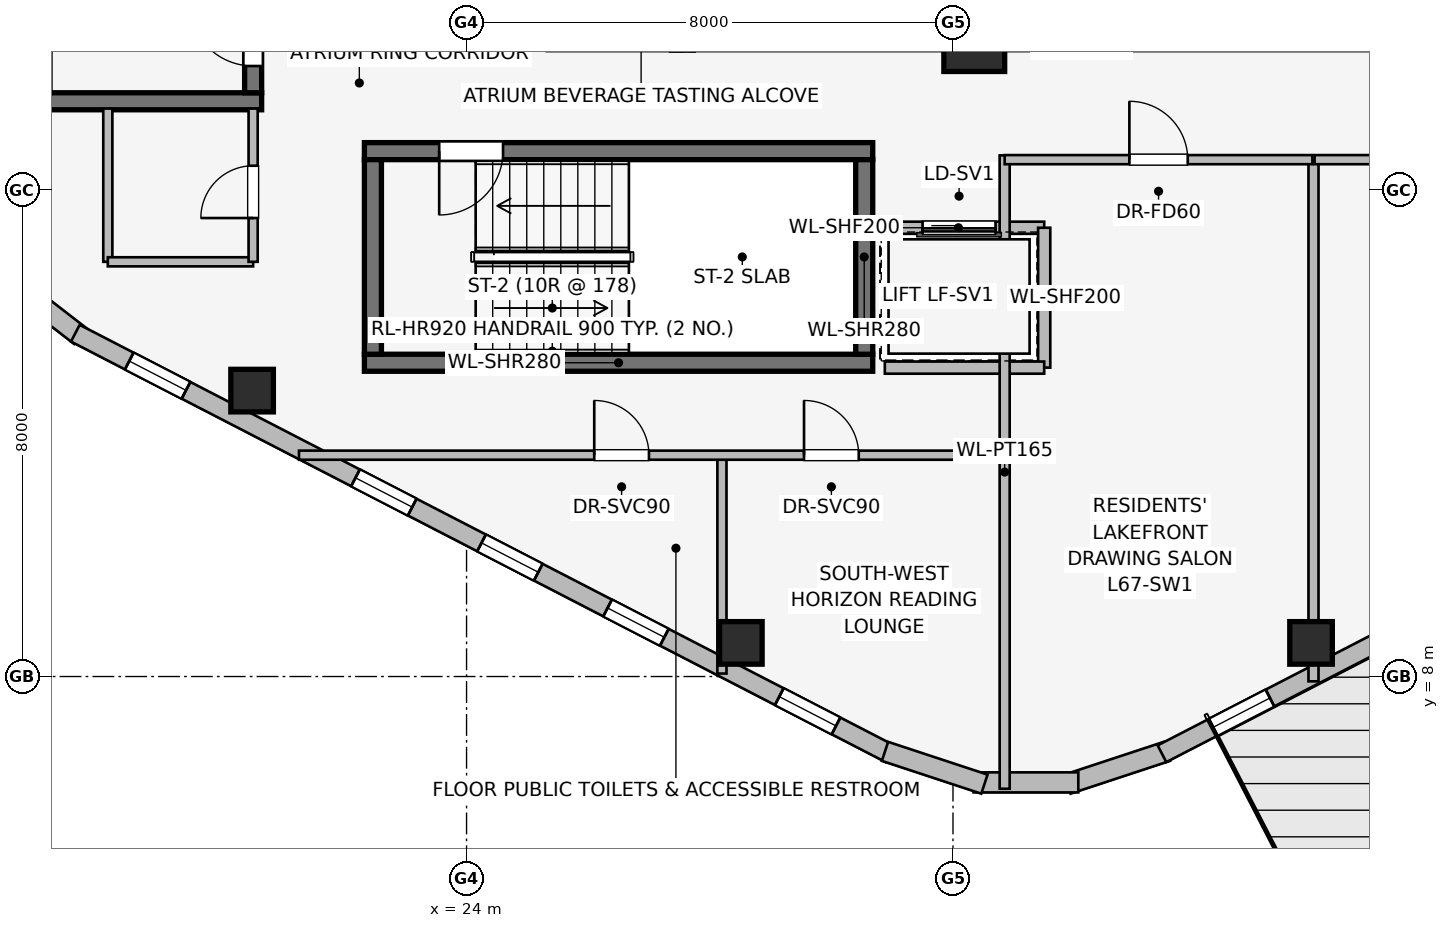
"""IFC4 building model, lengths in metres.
Left out: names, types, materials, properties, quantities, classifications, styles, units other than length and angle.
Written with IfcOpenShell. Run it as: python <this file> out.ifc"""

import sys

from ifc_helpers import new_model, si_unit, direction, frame, frame_2d, origin, origin_2d, place, context, subcontext, project, spatial, rectangle, extrude, element, fill, save


model = new_model("IFC4")
c1 = context("Model", 3, precision=1e-05, world=origin(), true_north=direction((0.0, 1.0)))
c2 = subcontext(c1, "Body", "Model", "MODEL_VIEW")
j1 = project(units=[si_unit("LENGTHUNIT", "METRE"), si_unit("PLANEANGLEUNIT", "RADIAN")], contexts=[c1])
p1 = place(None, origin())
s1 = spatial("IfcSite", under=j1, at=p1, CompositionType="ELEMENT")
p2 = place(p1, origin())
s2 = spatial("IfcBuilding", under=s1, at=p2, CompositionType="ELEMENT")
p3 = place(p2, frame((0.0, 0.0, 245.45)))
s3 = spatial("IfcBuildingStorey", under=s2, at=p3, CompositionType="ELEMENT", Elevation=245.45)
p4 = place(p3, frame((16.87, 17.46, 0.0), z_axis=(0.0, 0.0, 1.0), x_axis=(1.0, 0.0, 0.0)))
e1 = element("IfcWall", 1, at=p4, inside=s3, PredefinedType="SHEAR", context=c2, shape_type="SweptSolid", body=[
    extrude(rectangle(XDim=3.76, YDim=0.28, at=frame_2d((1.88, 0.0))), origin(), (0.0, 0.0, 1.0), 3.55),
])
p5 = place(p3, frame((20.49, 17.6, 0.0), z_axis=(0.0, 0.0, 1.0), x_axis=(0.0, 1.0, 0.0)))
e2 = element("IfcWall", 2, at=p5, inside=s3, PredefinedType="SHEAR", context=c2, shape_type="SweptSolid", body=[
    extrude(rectangle(XDim=7.8, YDim=0.28, at=frame_2d((3.9, 0.0))), origin(), (0.0, 0.0, 1.0), 3.55),
])
p6 = place(p5, frame((0.44, 0.0, 0.0)))
e3 = element("IfcOpeningElement", 3, at=p6, cuts=e2, PredefinedType="OPENING", context=c2, shape_type="SweptSolid", body=[
    extrude(rectangle(XDim=1.05, YDim=2.0, at=frame_2d((0.525, 1.0))), frame((0.0, 0.15, 0.0), z_axis=(0.0, -1.0, 0.0), x_axis=(1.0, 0.0, 0.0)), (0.0, 0.0, 1.0), 0.3),
])
p7 = place(p3, frame((22.32, 13.16, 0.0), z_axis=(0.0, 0.0, 1.0), x_axis=(1.0, 0.0, 0.0)))
e4 = element("IfcWall", 4, at=p7, inside=s3, PredefinedType="SHEAR", context=c2, shape_type="SweptSolid", body=[
    extrude(rectangle(XDim=8.36, YDim=0.28, at=frame_2d((4.18, 0.0))), origin(), (0.0, 0.0, 1.0), 3.55),
])
p8 = place(p3, frame((30.68, 16.64, 0.0), z_axis=(0.0, 0.0, 1.0), x_axis=(-1.0, 0.0, 0.0)))
e5 = element("IfcWall", 5, at=p8, inside=s3, PredefinedType="SHEAR", context=c2, shape_type="SweptSolid", body=[
    extrude(rectangle(XDim=8.36, YDim=0.28, at=frame_2d((4.18, 0.0))), origin(), (0.0, 0.0, 1.0), 3.55),
])
p9 = place(p8, frame((6.08, 0.0, 0.0)))
e6 = element("IfcOpeningElement", 6, at=p9, cuts=e5, PredefinedType="OPENING", context=c2, shape_type="SweptSolid", body=[
    extrude(rectangle(XDim=1.05, YDim=2.0, at=frame_2d((0.525, 1.0))), frame((0.0, 0.15, 0.0), z_axis=(0.0, -1.0, 0.0), x_axis=(1.0, 0.0, 0.0)), (0.0, 0.0, 1.0), 0.3),
])
for number, where, z_axis, x_axis in (
    (7, (22.46, 16.5, 0.0), (0.0, 0.0, 1.0), (0.0, -1.0, 0.0)),
    (8, (30.54, 13.3, 0.0), (0.0, 0.0, 1.0), (0.0, 1.0, 0.0)),
):
    element("IfcWall", number, at=place(p3, frame(where, z_axis=z_axis, x_axis=x_axis)), inside=s3, PredefinedType="SHEAR", context=c2, shape_type="SweptSolid", body=[
        extrude(rectangle(XDim=3.2, YDim=0.28, at=frame_2d((1.6, 0.0))), origin(), (0.0, 0.0, 1.0), 3.55),
    ])
p10 = place(p3, frame((32.35, 18.45, 0.0), z_axis=(0.0, 0.0, 1.0), x_axis=(1.0, 0.0, 0.0)))
e9 = element("IfcColumn", 9, at=p10, inside=s3, PredefinedType="COLUMN", context=c2, shape_type="SweptSolid", body=[
    extrude(rectangle(XDim=1.0, YDim=1.0, at=origin_2d()), origin(), (0.0, 0.0, 1.0), 3.55),
])
for number, where, z_axis, x_axis in (
    (10, (20.473, 12.702, 0.0), (0.0, 0.0, 1.0), (1.0, 0.0, 0.0)),
    (11, (28.511, 8.553, 0.0), (0.0, 0.0, 1.0), (1.0, 0.0, 0.0)),
    (12, (37.889, 8.553, 0.0), (0.0, 0.0, 1.0), (1.0, 0.0, 0.0)),
):
    element("IfcColumn", number, at=place(p3, frame(where, z_axis=z_axis, x_axis=x_axis)), inside=s3, PredefinedType="COLUMN", context=c2, shape_type="SweptSolid", body=[
        extrude(rectangle(XDim=0.7, YDim=0.7, at=origin_2d()), origin(), (0.0, 0.0, 1.0), 3.55),
    ])
p11 = place(p3, frame((17.647, 13.599, 0.0), z_axis=(0.0, 0.0, 1.0), x_axis=(-0.790691856293, 0.61221433207, 0.0)))
e13 = element("IfcWall", 13, at=p11, inside=s3, PredefinedType="STANDARD", context=c2, shape_type="SweptSolid", body=[
    extrude(rectangle(XDim=1.676, YDim=0.33, at=frame_2d((0.838, 0.0))), origin(), (0.0, 0.0, 1.0), 3.29),
])
p12 = place(p3, frame((30.963, 6.73, 0.0), z_axis=(0.0, 0.0, 1.0), x_axis=(-0.888581481622, 0.458718814218, 0.0)))
e14 = element("IfcWall", 14, at=p12, inside=s3, PredefinedType="STANDARD", context=c2, shape_type="SweptSolid", body=[
    extrude(rectangle(XDim=15.077, YDim=0.31, at=frame_2d((7.539, 0.0))), origin(), (0.0, 0.0, 1.0), 3.29),
])
p13 = place(p12, frame((0.998, 0.0, 0.75)))
e15 = element("IfcOpeningElement", 15, at=p13, cuts=e14, PredefinedType="OPENING", context=c2, shape_type="SweptSolid", body=[
    extrude(rectangle(XDim=1.05, YDim=1.4, at=frame_2d((0.525, 0.7))), frame((0.0, 0.165, 0.0), z_axis=(0.0, -1.0, 0.0), x_axis=(1.0, 0.0, 0.0)), (0.0, 0.0, 1.0), 0.33),
])
p14 = place(p12, frame((4.176, 0.0, 0.75)))
e16 = element("IfcOpeningElement", 16, at=p14, cuts=e14, PredefinedType="OPENING", context=c2, shape_type="SweptSolid", body=[
    extrude(rectangle(XDim=1.05, YDim=1.4, at=frame_2d((0.525, 0.7))), frame((0.0, 0.165, 0.0), z_axis=(0.0, -1.0, 0.0), x_axis=(1.0, 0.0, 0.0)), (0.0, 0.0, 1.0), 0.33),
])
p15 = place(p12, frame((6.509, 0.0, 0.75)))
e17 = element("IfcOpeningElement", 17, at=p15, cuts=e14, PredefinedType="OPENING", context=c2, shape_type="SweptSolid", body=[
    extrude(rectangle(XDim=1.05, YDim=1.4, at=frame_2d((0.525, 0.7))), frame((0.0, 0.165, 0.0), z_axis=(0.0, -1.0, 0.0), x_axis=(1.0, 0.0, 0.0)), (0.0, 0.0, 1.0), 0.33),
])
p16 = place(p12, frame((8.842, 0.0, 0.75)))
e18 = element("IfcOpeningElement", 18, at=p16, cuts=e14, PredefinedType="OPENING", context=c2, shape_type="SweptSolid", body=[
    extrude(rectangle(XDim=1.05, YDim=1.4, at=frame_2d((0.525, 0.7))), frame((0.0, 0.165, 0.0), z_axis=(0.0, -1.0, 0.0), x_axis=(1.0, 0.0, 0.0)), (0.0, 0.0, 1.0), 0.33),
])
p17 = place(p12, frame((13.029, 0.0, 0.75)))
e19 = element("IfcOpeningElement", 19, at=p17, cuts=e14, PredefinedType="OPENING", context=c2, shape_type="SweptSolid", body=[
    extrude(rectangle(XDim=1.05, YDim=1.4, at=frame_2d((0.525, 0.7))), frame((0.0, 0.165, 0.0), z_axis=(0.0, -1.0, 0.0), x_axis=(1.0, 0.0, 0.0)), (0.0, 0.0, 1.0), 0.33),
])
p18 = place(p3, frame((35.518, 6.769, 0.0), z_axis=(0.0, 0.0, 1.0), x_axis=(-0.949713440491, -0.313120393699, 0.0)))
e20 = element("IfcWall", 20, at=p18, inside=s3, PredefinedType="STANDARD", context=c2, shape_type="SweptSolid", body=[
    extrude(rectangle(XDim=1.722, YDim=0.33, at=frame_2d((0.861, 0.0))), origin(), (0.0, 0.0, 1.0), 3.29),
])
p19 = place(p3, frame((34.061, 6.259, 0.0), z_axis=(0.0, 0.0, 1.0), x_axis=(-1.0, 0.0, 0.0)))
e21 = element("IfcWall", 21, at=p19, inside=s3, PredefinedType="STANDARD", context=c2, shape_type="SweptSolid", body=[
    extrude(rectangle(XDim=1.722, YDim=0.33, at=frame_2d((0.861, 0.0))), origin(), (0.0, 0.0, 1.0), 3.29),
])
p20 = place(p3, frame((32.517, 6.23, 0.0), z_axis=(0.0, 0.0, 1.0), x_axis=(-0.949713440491, 0.313120393699, 0.0)))
e22 = element("IfcWall", 22, at=p20, inside=s3, PredefinedType="STANDARD", context=c2, shape_type="SweptSolid", body=[
    extrude(rectangle(XDim=1.722, YDim=0.33, at=frame_2d((0.861, 0.0))), origin(), (0.0, 0.0, 1.0), 3.29),
])
p21 = place(p3, frame((48.834, 13.646, 0.0), z_axis=(0.0, 0.0, 1.0), x_axis=(-0.888581481622, -0.458718814218, 0.0)))
e23 = element("IfcWall", 23, at=p21, inside=s3, PredefinedType="STANDARD", context=c2, shape_type="SweptSolid", body=[
    extrude(rectangle(XDim=15.077, YDim=0.31, at=frame_2d((7.539, 0.0))), origin(), (0.0, 0.0, 1.0), 3.29),
])
p22 = place(p21, frame((8.563, 0.0, 0.0)))
e24 = element("IfcOpeningElement", 24, at=p22, cuts=e23, PredefinedType="OPENING", context=c2, shape_type="SweptSolid", body=[
    extrude(rectangle(XDim=1.65, YDim=2.25, at=frame_2d((0.825, 1.125))), frame((0.0, 0.165, 0.0), z_axis=(0.0, -1.0, 0.0), x_axis=(1.0, 0.0, 0.0)), (0.0, 0.0, 1.0), 0.33),
])
p23 = place(p21, frame((0.998, 0.0, 0.75)))
e25 = element("IfcOpeningElement", 25, at=p23, cuts=e23, PredefinedType="OPENING", context=c2, shape_type="SweptSolid", body=[
    extrude(rectangle(XDim=1.05, YDim=1.4, at=frame_2d((0.525, 0.7))), frame((0.0, 0.165, 0.0), z_axis=(0.0, -1.0, 0.0), x_axis=(1.0, 0.0, 0.0)), (0.0, 0.0, 1.0), 0.33),
])
p24 = place(p21, frame((3.796, 0.0, 0.75)))
e26 = element("IfcOpeningElement", 26, at=p24, cuts=e23, PredefinedType="OPENING", context=c2, shape_type="SweptSolid", body=[
    extrude(rectangle(XDim=1.05, YDim=1.4, at=frame_2d((0.525, 0.7))), frame((0.0, 0.165, 0.0), z_axis=(0.0, -1.0, 0.0), x_axis=(1.0, 0.0, 0.0)), (0.0, 0.0, 1.0), 0.33),
])
p25 = place(p21, frame((5.365, 0.0, 0.75)))
e27 = element("IfcOpeningElement", 27, at=p25, cuts=e23, PredefinedType="OPENING", context=c2, shape_type="SweptSolid", body=[
    extrude(rectangle(XDim=1.05, YDim=1.4, at=frame_2d((0.525, 0.7))), frame((0.0, 0.165, 0.0), z_axis=(0.0, -1.0, 0.0), x_axis=(1.0, 0.0, 0.0)), (0.0, 0.0, 1.0), 0.33),
])
p26 = place(p21, frame((6.934, 0.0, 0.75)))
e28 = element("IfcOpeningElement", 28, at=p26, cuts=e23, PredefinedType="OPENING", context=c2, shape_type="SweptSolid", body=[
    extrude(rectangle(XDim=1.05, YDim=1.4, at=frame_2d((0.525, 0.7))), frame((0.0, 0.165, 0.0), z_axis=(0.0, -1.0, 0.0), x_axis=(1.0, 0.0, 0.0)), (0.0, 0.0, 1.0), 0.33),
])
p27 = place(p21, frame((13.078, 0.0, 0.75)))
e29 = element("IfcOpeningElement", 29, at=p27, cuts=e23, PredefinedType="OPENING", context=c2, shape_type="SweptSolid", body=[
    extrude(rectangle(XDim=1.05, YDim=1.4, at=frame_2d((0.525, 0.7))), frame((0.0, 0.165, 0.0), z_axis=(0.0, -1.0, 0.0), x_axis=(1.0, 0.0, 0.0)), (0.0, 0.0, 1.0), 0.33),
])
p28 = place(p3, frame((33.5, 15.38, 0.0), z_axis=(0.0, 0.0, 1.0), x_axis=(-1.0, 0.0, 0.0)))
e30 = element("IfcWall", 30, at=p28, inside=s3, PredefinedType="PARTITIONING", context=c2, shape_type="SweptSolid", body=[
    extrude(rectangle(XDim=2.82, YDim=0.2, at=frame_2d((1.41, 0.0))), origin(), (0.0, 0.0, 1.0), 3.29),
])
p29 = place(p28, frame((0.8, 0.0, 0.0)))
e31 = element("IfcOpeningElement", 31, at=p29, cuts=e30, PredefinedType="OPENING", context=c2, shape_type="SweptSolid", body=[
    extrude(rectangle(XDim=1.2, YDim=2.2, at=frame_2d((0.6, 1.1))), frame((0.0, 0.11, 0.0), z_axis=(0.0, -1.0, 0.0), x_axis=(1.0, 0.0, 0.0)), (0.0, 0.0, 1.0), 0.22),
])
p30 = place(p3, frame((33.5, 13.08, 0.0), z_axis=(0.0, 0.0, 1.0), x_axis=(0.0, 1.0, 0.0)))
e32 = element("IfcWall", 32, at=p30, inside=s3, PredefinedType="PARTITIONING", context=c2, shape_type="SweptSolid", body=[
    extrude(rectangle(XDim=2.3, YDim=0.2, at=frame_2d((1.15, 0.0))), origin(), (0.0, 0.0, 1.0), 3.29),
])
p31 = place(p3, frame((30.879, 13.08, 0.0), z_axis=(0.0, 0.0, 1.0), x_axis=(1.0, 0.0, 0.0)))
e33 = element("IfcWall", 33, at=p31, inside=s3, PredefinedType="PARTITIONING", context=c2, shape_type="SweptSolid", body=[
    extrude(rectangle(XDim=2.621, YDim=0.2, at=frame_2d((1.311, 0.0))), origin(), (0.0, 0.0, 1.0), 3.29),
])
p32 = place(p3, frame((18.1, 17.34, 0.0), z_axis=(0.0, 0.0, 1.0), x_axis=(0.0, -1.0, 0.0)))
e34 = element("IfcWall", 34, at=p32, inside=s3, PredefinedType="PARTITIONING", context=c2, shape_type="SweptSolid", body=[
    extrude(rectangle(XDim=2.52, YDim=0.15, at=frame_2d((1.26, 0.0))), origin(), (0.0, 0.0, 1.0), 3.29),
])
p33 = place(p3, frame((18.1, 14.82, 0.0), z_axis=(0.0, 0.0, 1.0), x_axis=(1.0, 0.0, 0.0)))
e35 = element("IfcWall", 35, at=p33, inside=s3, PredefinedType="PARTITIONING", context=c2, shape_type="SweptSolid", body=[
    extrude(rectangle(XDim=2.39, YDim=0.15, at=frame_2d((1.195, 0.0))), origin(), (0.0, 0.0, 1.0), 3.29),
])
p34 = place(p3, frame((20.49, 14.82, 0.0), z_axis=(0.0, 0.0, 1.0), x_axis=(0.0, 1.0, 0.0)))
e36 = element("IfcWall", 36, at=p34, inside=s3, PredefinedType="PARTITIONING", context=c2, shape_type="SweptSolid", body=[
    extrude(rectangle(XDim=2.52, YDim=0.15, at=frame_2d((1.26, 0.0))), origin(), (0.0, 0.0, 1.0), 3.29),
])
p35 = place(p34, frame((0.72, 0.0, 0.0)))
e37 = element("IfcOpeningElement", 37, at=p35, cuts=e36, PredefinedType="OPENING", context=c2, shape_type="SweptSolid", body=[
    extrude(rectangle(XDim=0.86, YDim=2.0, at=frame_2d((0.43, 1.0))), frame((0.0, 0.085, 0.0), z_axis=(0.0, -1.0, 0.0), x_axis=(1.0, 0.0, 0.0)), (0.0, 0.0, 1.0), 0.17),
])
p36 = place(p3, frame((32.85, 6.154, 0.0), z_axis=(0.0, 0.0, 1.0), x_axis=(0.0, 1.0, 0.0)))
e38 = element("IfcWall", 38, at=p36, inside=s3, PredefinedType="PARTITIONING", context=c2, shape_type="SweptSolid", body=[
    extrude(rectangle(XDim=10.416, YDim=0.165, at=frame_2d((5.208, 0.0))), origin(), (0.0, 0.0, 1.0), 3.29),
])
p37 = place(p3, frame((28.2, 8.049, 0.0), z_axis=(0.0, 0.0, 1.0), x_axis=(0.0, 1.0, 0.0)))
e39 = element("IfcWall", 39, at=p37, inside=s3, PredefinedType="PARTITIONING", context=c2, shape_type="SweptSolid", body=[
    extrude(rectangle(XDim=3.591, YDim=0.15, at=frame_2d((1.795, 0.0))), origin(), (0.0, 0.0, 1.0), 3.29),
])
p38 = place(p3, frame((21.244, 11.64, 0.0), z_axis=(0.0, 0.0, 1.0), x_axis=(1.0, 0.0, 0.0)))
e40 = element("IfcWall", 40, at=p38, inside=s3, PredefinedType="PARTITIONING", context=c2, shape_type="SweptSolid", body=[
    extrude(rectangle(XDim=11.606, YDim=0.15, at=frame_2d((5.803, 0.0))), origin(), (0.0, 0.0, 1.0), 2.833),
])
p39 = place(p38, frame((4.856, 0.0, 0.0)))
e41 = element("IfcOpeningElement", 41, at=p39, cuts=e40, PredefinedType="OPENING", context=c2, shape_type="SweptSolid", body=[
    extrude(rectangle(XDim=0.9, YDim=2.0, at=frame_2d((0.45, 1.0))), frame((0.0, 0.085, 0.0), z_axis=(0.0, -1.0, 0.0), x_axis=(1.0, 0.0, 0.0)), (0.0, 0.0, 1.0), 0.17),
])
p40 = place(p38, frame((8.306, 0.0, 0.0)))
e42 = element("IfcOpeningElement", 42, at=p40, cuts=e40, PredefinedType="OPENING", context=c2, shape_type="SweptSolid", body=[
    extrude(rectangle(XDim=0.9, YDim=2.0, at=frame_2d((0.45, 1.0))), frame((0.0, 0.085, 0.0), z_axis=(0.0, -1.0, 0.0), x_axis=(1.0, 0.0, 0.0)), (0.0, 0.0, 1.0), 0.17),
])
p41 = place(p3, frame((37.929, 7.921, 0.0), z_axis=(0.0, 0.0, 1.0), x_axis=(0.0, 1.0, 0.0)))
e43 = element("IfcWall", 43, at=p41, inside=s3, PredefinedType="PARTITIONING", context=c2, shape_type="SweptSolid", body=[
    extrude(rectangle(XDim=8.549, YDim=0.165, at=frame_2d((4.274, 0.0))), origin(), (0.0, 0.0, 1.0), 2.679),
])
p42 = place(p3, frame((32.85, 16.5, 0.0), z_axis=(0.0, 0.0, 1.0), x_axis=(1.0, 0.0, 0.0)))
e44 = element("IfcWall", 44, at=p42, inside=s3, PredefinedType="PARTITIONING", context=c2, shape_type="SweptSolid", body=[
    extrude(rectangle(XDim=5.061, YDim=0.15, at=frame_2d((2.53, 0.0))), origin(), (0.0, 0.0, 1.0), 3.29),
])
p43 = place(p42, frame((2.051, 0.0, 0.0)))
e45 = element("IfcOpeningElement", 45, at=p43, cuts=e44, PredefinedType="OPENING", context=c2, shape_type="SweptSolid", body=[
    extrude(rectangle(XDim=0.96, YDim=2.0, at=frame_2d((0.48, 1.0))), frame((0.0, 0.085, 0.0), z_axis=(0.0, -1.0, 0.0), x_axis=(1.0, 0.0, 0.0)), (0.0, 0.0, 1.0), 0.17),
])
p44 = place(p3, frame((37.947, 16.5, 0.0), z_axis=(0.0, 0.0, 1.0), x_axis=(1.0, 0.0, 0.0)))
e46 = element("IfcWall", 46, at=p44, inside=s3, PredefinedType="PARTITIONING", context=c2, shape_type="SweptSolid", body=[
    extrude(rectangle(XDim=3.513, YDim=0.15, at=frame_2d((1.756, 0.0))), origin(), (0.0, 0.0, 1.0), 3.29),
])
p45 = place(p44, frame((1.277, 0.0, 0.0)))
e47 = element("IfcOpeningElement", 47, at=p45, cuts=e46, PredefinedType="OPENING", context=c2, shape_type="SweptSolid", body=[
    extrude(rectangle(XDim=0.96, YDim=2.0, at=frame_2d((0.48, 1.0))), frame((0.0, 0.085, 0.0), z_axis=(0.0, -1.0, 0.0), x_axis=(1.0, 0.0, 0.0)), (0.0, 0.0, 1.0), 0.17),
])
p46 = place(p13, origin())
e48 = element("IfcWindow", 48, at=p46, inside=s3, PartitioningType="SINGLE_PANEL", PredefinedType="WINDOW", context=c2, shape_type="SweptSolid", body=[
    extrude(rectangle(XDim=1.05, YDim=1.4, at=frame_2d((0.525, 0.7))), frame((0.0, 0.03, 0.0), z_axis=(0.0, -1.0, 0.0), x_axis=(1.0, 0.0, 0.0)), (0.0, 0.0, 1.0), 0.06),
])
fill(e15, e48)
p47 = place(p14, origin())
e49 = element("IfcWindow", 49, at=p47, inside=s3, PartitioningType="SINGLE_PANEL", PredefinedType="WINDOW", context=c2, shape_type="SweptSolid", body=[
    extrude(rectangle(XDim=1.05, YDim=1.4, at=frame_2d((0.525, 0.7))), frame((0.0, 0.03, 0.0), z_axis=(0.0, -1.0, 0.0), x_axis=(1.0, 0.0, 0.0)), (0.0, 0.0, 1.0), 0.06),
])
fill(e16, e49)
p48 = place(p15, origin())
e50 = element("IfcWindow", 50, at=p48, inside=s3, PartitioningType="SINGLE_PANEL", PredefinedType="WINDOW", context=c2, shape_type="SweptSolid", body=[
    extrude(rectangle(XDim=1.05, YDim=1.4, at=frame_2d((0.525, 0.7))), frame((0.0, 0.03, 0.0), z_axis=(0.0, -1.0, 0.0), x_axis=(1.0, 0.0, 0.0)), (0.0, 0.0, 1.0), 0.06),
])
fill(e17, e50)
p49 = place(p16, origin())
e51 = element("IfcWindow", 51, at=p49, inside=s3, PartitioningType="SINGLE_PANEL", PredefinedType="WINDOW", context=c2, shape_type="SweptSolid", body=[
    extrude(rectangle(XDim=1.05, YDim=1.4, at=frame_2d((0.525, 0.7))), frame((0.0, 0.03, 0.0), z_axis=(0.0, -1.0, 0.0), x_axis=(1.0, 0.0, 0.0)), (0.0, 0.0, 1.0), 0.06),
])
fill(e18, e51)
p50 = place(p17, origin())
e52 = element("IfcWindow", 52, at=p50, inside=s3, PartitioningType="SINGLE_PANEL", PredefinedType="WINDOW", context=c2, shape_type="SweptSolid", body=[
    extrude(rectangle(XDim=1.05, YDim=1.4, at=frame_2d((0.525, 0.7))), frame((0.0, 0.03, 0.0), z_axis=(0.0, -1.0, 0.0), x_axis=(1.0, 0.0, 0.0)), (0.0, 0.0, 1.0), 0.06),
])
fill(e19, e52)
p51 = place(p27, origin())
e53 = element("IfcWindow", 53, at=p51, inside=s3, PartitioningType="SINGLE_PANEL", PredefinedType="WINDOW", context=c2, shape_type="SweptSolid", body=[
    extrude(rectangle(XDim=1.05, YDim=1.4, at=frame_2d((0.525, 0.7))), frame((0.0, 0.03, 0.0), z_axis=(0.0, -1.0, 0.0), x_axis=(1.0, 0.0, 0.0)), (0.0, 0.0, 1.0), 0.06),
])
fill(e29, e53)
p52 = place(p6, origin())
e54 = element("IfcDoor", 54, at=p52, inside=s3, OperationType="SINGLE_SWING_RIGHT", PredefinedType="DOOR", context=c2, shape_type="SweptSolid", body=[
    extrude(rectangle(XDim=1.05, YDim=2.0, at=frame_2d((0.525, 1.0))), frame((0.0, 0.025, 0.0), z_axis=(0.0, -1.0, 0.0), x_axis=(1.0, 0.0, 0.0)), (0.0, 0.0, 1.0), 0.05),
])
fill(e3, e54)
p53 = place(p9, origin())
e55 = element("IfcDoor", 55, at=p53, inside=s3, OperationType="SINGLE_SWING_RIGHT", PredefinedType="DOOR", context=c2, shape_type="SweptSolid", body=[
    extrude(rectangle(XDim=1.05, YDim=2.0, at=frame_2d((0.525, 1.0))), frame((0.0, 0.025, 0.0), z_axis=(0.0, -1.0, 0.0), x_axis=(1.0, 0.0, 0.0)), (0.0, 0.0, 1.0), 0.05),
])
fill(e6, e55)
p54 = place(p29, origin())
e56 = element("IfcDoor", 56, at=p54, inside=s3, OperationType="SLIDING_TO_RIGHT", PredefinedType="DOOR", context=c2, shape_type="SweptSolid", body=[
    extrude(rectangle(XDim=1.2, YDim=2.2, at=frame_2d((0.6, 1.1))), frame((0.0, 0.025, 0.0), z_axis=(0.0, -1.0, 0.0), x_axis=(1.0, 0.0, 0.0)), (0.0, 0.0, 1.0), 0.05),
])
fill(e31, e56)
p55 = place(p35, origin())
e57 = element("IfcDoor", 57, at=p55, inside=s3, OperationType="SINGLE_SWING_LEFT", PredefinedType="DOOR", context=c2, shape_type="SweptSolid", body=[
    extrude(rectangle(XDim=0.86, YDim=2.0, at=frame_2d((0.43, 1.0))), frame((0.0, 0.025, 0.0), z_axis=(0.0, -1.0, 0.0), x_axis=(1.0, 0.0, 0.0)), (0.0, 0.0, 1.0), 0.05),
])
fill(e37, e57)
p56 = place(p39, origin())
e58 = element("IfcDoor", 58, at=p56, inside=s3, OperationType="SINGLE_SWING_LEFT", PredefinedType="DOOR", context=c2, shape_type="SweptSolid", body=[
    extrude(rectangle(XDim=0.9, YDim=2.0, at=frame_2d((0.45, 1.0))), frame((0.0, 0.025, 0.0), z_axis=(0.0, -1.0, 0.0), x_axis=(1.0, 0.0, 0.0)), (0.0, 0.0, 1.0), 0.05),
])
fill(e41, e58)
p57 = place(p40, origin())
e59 = element("IfcDoor", 59, at=p57, inside=s3, OperationType="SINGLE_SWING_LEFT", PredefinedType="DOOR", context=c2, shape_type="SweptSolid", body=[
    extrude(rectangle(XDim=0.9, YDim=2.0, at=frame_2d((0.45, 1.0))), frame((0.0, 0.025, 0.0), z_axis=(0.0, -1.0, 0.0), x_axis=(1.0, 0.0, 0.0)), (0.0, 0.0, 1.0), 0.05),
])
fill(e42, e59)
p58 = place(p43, origin())
e60 = element("IfcDoor", 60, at=p58, inside=s3, OperationType="SINGLE_SWING_LEFT", PredefinedType="DOOR", context=c2, shape_type="SweptSolid", body=[
    extrude(rectangle(XDim=0.96, YDim=2.0, at=frame_2d((0.48, 1.0))), frame((0.0, 0.025, 0.0), z_axis=(0.0, -1.0, 0.0), x_axis=(1.0, 0.0, 0.0)), (0.0, 0.0, 1.0), 0.05),
])
fill(e45, e60)
save(model, sys.argv[1])
